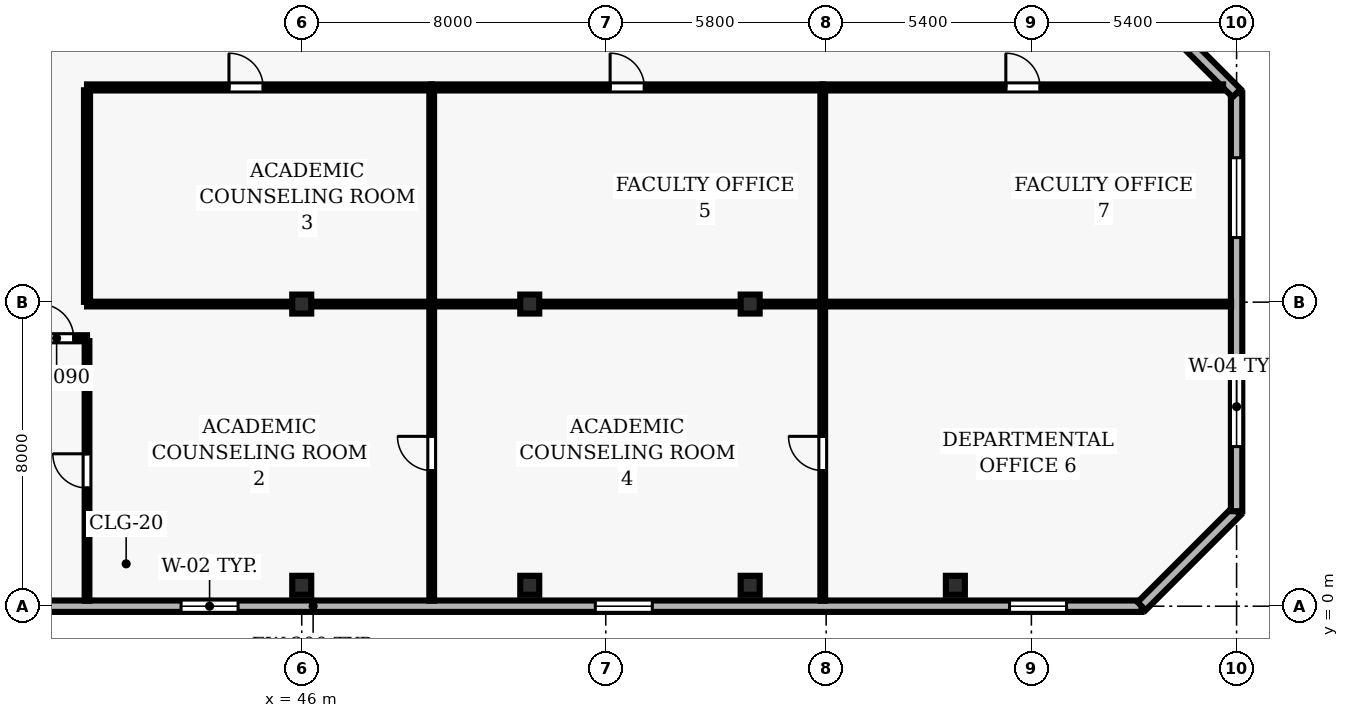
"""IFC4 building model, lengths in metres.
Left out: names, types, materials, properties, quantities, classifications, styles, units other than length and angle.
Written with IfcOpenShell. Run it as: python <this file> out.ifc"""

import sys

from ifc_helpers import new_model, si_unit, direction, frame, frame_2d, origin, origin_2d, place, context, subcontext, project, spatial, rectangle, hollow_rectangle, extrude, element, fill, save


model = new_model("IFC4")
c1 = context("Model", 3, precision=1e-05, world=origin(), true_north=direction((0.0, 1.0)))
c2 = subcontext(c1, "Body", "Model", "MODEL_VIEW")
j1 = project(units=[si_unit("LENGTHUNIT", "METRE"), si_unit("PLANEANGLEUNIT", "RADIAN")], contexts=[c1])
p1 = place(None, origin())
s1 = spatial("IfcSite", under=j1, at=p1, CompositionType="ELEMENT")
p2 = place(p1, origin())
s2 = spatial("IfcBuilding", under=s1, at=p2, CompositionType="ELEMENT")
p3 = place(p2, frame((0.0, 0.0, 154.1)))
s3 = spatial("IfcBuildingStorey", under=s2, at=p3, CompositionType="ELEMENT", Elevation=154.1)
for number, where, z_axis, x_axis in (
    (1, (46.0, 0.55, 0.0), (0.0, 0.0, 1.0), (1.0, 0.0, 0.0)),
    (2, (46.0, 7.95, 0.0), (0.0, 0.0, 1.0), (1.0, 0.0, 0.0)),
    (3, (52.0, 0.55, 0.0), (0.0, 0.0, 1.0), (1.0, 0.0, 0.0)),
    (4, (52.0, 7.95, 0.0), (0.0, 0.0, 1.0), (1.0, 0.0, 0.0)),
    (5, (57.8, 0.55, 0.0), (0.0, 0.0, 1.0), (1.0, 0.0, 0.0)),
    (6, (57.8, 7.95, 0.0), (0.0, 0.0, 1.0), (1.0, 0.0, 0.0)),
    (7, (63.2, 0.55, 0.0), (0.0, 0.0, 1.0), (1.0, 0.0, 0.0)),
):
    element("IfcColumn", number, at=place(p3, frame(where, z_axis=z_axis, x_axis=x_axis)), inside=s3, PredefinedType="COLUMN", context=c2, shape_type="SweptSolid", body=[
        extrude(hollow_rectangle(XDim=0.5, YDim=0.5, WallThickness=0.025, at=origin_2d()), origin(), (0.0, 0.0, 1.0), 3.9),
    ])
p4 = place(p3, frame((24.5, 0.0, 0.0), z_axis=(0.0, 0.0, 1.0), x_axis=(1.0, 0.0, 0.0)))
e8 = element("IfcWall", 8, at=p4, inside=s3, PredefinedType="SOLIDWALL", context=c2, shape_type="SweptSolid", body=[
    extrude(rectangle(XDim=43.6, YDim=0.3, at=frame_2d((21.8, 0.0))), origin(), (0.0, 0.0, 1.0), 3.69),
])
p5 = place(p4, frame((1.975, 0.0, 0.9)))
e9 = element("IfcOpeningElement", 9, at=p5, cuts=e8, PredefinedType="OPENING", context=c2, shape_type="SweptSolid", body=[
    extrude(rectangle(XDim=1.5, YDim=1.6, at=frame_2d((0.75, 0.8))), frame((0.0, 0.16, 0.0), z_axis=(0.0, -1.0, 0.0), x_axis=(1.0, 0.0, 0.0)), (0.0, 0.0, 1.0), 0.32),
])
p6 = place(p4, frame((8.325, 0.0, 0.9)))
e10 = element("IfcOpeningElement", 10, at=p6, cuts=e8, PredefinedType="OPENING", context=c2, shape_type="SweptSolid", body=[
    extrude(rectangle(XDim=1.5, YDim=1.6, at=frame_2d((0.75, 0.8))), frame((0.0, 0.16, 0.0), z_axis=(0.0, -1.0, 0.0), x_axis=(1.0, 0.0, 0.0)), (0.0, 0.0, 1.0), 0.32),
])
p7 = place(p4, frame((18.325, 0.0, 0.9)))
e11 = element("IfcOpeningElement", 11, at=p7, cuts=e8, PredefinedType="OPENING", context=c2, shape_type="SweptSolid", body=[
    extrude(rectangle(XDim=1.5, YDim=1.6, at=frame_2d((0.75, 0.8))), frame((0.0, 0.16, 0.0), z_axis=(0.0, -1.0, 0.0), x_axis=(1.0, 0.0, 0.0)), (0.0, 0.0, 1.0), 0.32),
])
p8 = place(p4, frame((29.225, 0.0, 0.9)))
e12 = element("IfcOpeningElement", 12, at=p8, cuts=e8, PredefinedType="OPENING", context=c2, shape_type="SweptSolid", body=[
    extrude(rectangle(XDim=1.5, YDim=1.6, at=frame_2d((0.75, 0.8))), frame((0.0, 0.16, 0.0), z_axis=(0.0, -1.0, 0.0), x_axis=(1.0, 0.0, 0.0)), (0.0, 0.0, 1.0), 0.32),
])
p9 = place(p4, frame((40.125, 0.0, 0.9)))
e13 = element("IfcOpeningElement", 13, at=p9, cuts=e8, PredefinedType="OPENING", context=c2, shape_type="SweptSolid", body=[
    extrude(rectangle(XDim=1.5, YDim=1.6, at=frame_2d((0.75, 0.8))), frame((0.0, 0.16, 0.0), z_axis=(0.0, -1.0, 0.0), x_axis=(1.0, 0.0, 0.0)), (0.0, 0.0, 1.0), 0.32),
])
p10 = place(p3, frame((68.1, 0.0, 0.0), z_axis=(0.0, 0.0, 1.0), x_axis=(0.707106781187, 0.707106781187, 0.0)))
e14 = element("IfcWall", 14, at=p10, inside=s3, PredefinedType="SOLIDWALL", context=c2, shape_type="SweptSolid", body=[
    extrude(rectangle(XDim=3.536, YDim=0.3, at=frame_2d((1.768, 0.0))), origin(), (0.0, 0.0, 1.0), 3.69),
])
p11 = place(p3, frame((70.6, 2.5, 0.0), z_axis=(0.0, 0.0, 1.0), x_axis=(0.0, 1.0, 0.0)))
e15 = element("IfcWall", 15, at=p11, inside=s3, PredefinedType="SOLIDWALL", context=c2, shape_type="SweptSolid", body=[
    extrude(rectangle(XDim=11.0, YDim=0.3, at=frame_2d((5.5, 0.0))), origin(), (0.0, 0.0, 1.0), 3.69),
])
p12 = place(p11, frame((1.7, 0.0, 0.9)))
e16 = element("IfcOpeningElement", 16, at=p12, cuts=e15, PredefinedType="OPENING", context=c2, shape_type="SweptSolid", body=[
    extrude(rectangle(XDim=2.1, YDim=1.6, at=frame_2d((1.05, 0.8))), frame((0.0, 0.16, 0.0), z_axis=(0.0, -1.0, 0.0), x_axis=(1.0, 0.0, 0.0)), (0.0, 0.0, 1.0), 0.32),
])
p13 = place(p11, frame((7.2, 0.0, 0.9)))
e17 = element("IfcOpeningElement", 17, at=p13, cuts=e15, PredefinedType="OPENING", context=c2, shape_type="SweptSolid", body=[
    extrude(rectangle(XDim=2.1, YDim=1.6, at=frame_2d((1.05, 0.8))), frame((0.0, 0.16, 0.0), z_axis=(0.0, -1.0, 0.0), x_axis=(1.0, 0.0, 0.0)), (0.0, 0.0, 1.0), 0.32),
])
p14 = place(p3, frame((70.6, 13.5, 0.0), z_axis=(0.0, 0.0, 1.0), x_axis=(-0.707106781187, 0.707106781187, 0.0)))
e18 = element("IfcWall", 18, at=p14, inside=s3, PredefinedType="SOLIDWALL", context=c2, shape_type="SweptSolid", body=[
    extrude(rectangle(XDim=3.536, YDim=0.3, at=frame_2d((1.768, 0.0))), origin(), (0.0, 0.0, 1.0), 3.69),
])
p15 = place(p3, frame((38.05, 7.05, 0.0), z_axis=(0.0, 0.0, 1.0), x_axis=(1.0, 0.0, 0.0)))
e19 = element("IfcWall", 19, at=p15, inside=s3, PredefinedType="PARTITIONING", context=c2, shape_type="SweptSolid", body=[
    extrude(rectangle(XDim=2.3, YDim=0.16, at=frame_2d((1.15, 0.0))), origin(), (0.0, 0.0, 1.0), 3.69),
])
p16 = place(p15, frame((1.05, 0.0, 0.0)))
e20 = element("IfcOpeningElement", 20, at=p16, cuts=e19, PredefinedType="OPENING", context=c2, shape_type="SweptSolid", body=[
    extrude(rectangle(XDim=0.9, YDim=2.1, at=frame_2d((0.45, 1.05))), frame((0.0, 0.09, 0.0), z_axis=(0.0, -1.0, 0.0), x_axis=(1.0, 0.0, 0.0)), (0.0, 0.0, 1.0), 0.18),
])
p17 = place(p3, frame((40.35, 13.65, 0.0), z_axis=(0.0, 0.0, 1.0), x_axis=(1.0, 0.0, 0.0)))
e21 = element("IfcWall", 21, at=p17, inside=s3, PredefinedType="PARTITIONING", context=c2, shape_type="SweptSolid", body=[
    extrude(rectangle(XDim=9.07, YDim=0.16, at=frame_2d((4.535, 0.0))), origin(), (0.0, 0.0, 1.0), 3.69),
])
p18 = place(p17, frame((3.735, 0.0, 0.0)))
e22 = element("IfcOpeningElement", 22, at=p18, cuts=e21, PredefinedType="OPENING", context=c2, shape_type="SweptSolid", body=[
    extrude(rectangle(XDim=0.9, YDim=2.1, at=frame_2d((0.45, 1.05))), frame((0.0, 0.09, 0.0), z_axis=(0.0, -1.0, 0.0), x_axis=(1.0, 0.0, 0.0)), (0.0, 0.0, 1.0), 0.18),
])
p19 = place(p3, frame((49.42, 7.95, 0.0), z_axis=(0.0, 0.0, 1.0), x_axis=(-1.0, 0.0, 0.0)))
e23 = element("IfcWall", 23, at=p19, inside=s3, PredefinedType="PARTITIONING", context=c2, shape_type="SweptSolid", body=[
    extrude(rectangle(XDim=9.07, YDim=0.125, at=frame_2d((4.535, 0.0))), origin(), (0.0, 0.0, 1.0), 3.073),
])
p20 = place(p3, frame((49.42, 13.65, 0.0), z_axis=(0.0, 0.0, 1.0), x_axis=(1.0, 0.0, 0.0)))
e24 = element("IfcWall", 24, at=p20, inside=s3, PredefinedType="PARTITIONING", context=c2, shape_type="SweptSolid", body=[
    extrude(rectangle(XDim=10.29, YDim=0.16, at=frame_2d((5.145, 0.0))), origin(), (0.0, 0.0, 1.0), 3.69),
])
p21 = place(p20, frame((4.695, 0.0, 0.0)))
e25 = element("IfcOpeningElement", 25, at=p21, cuts=e24, PredefinedType="OPENING", context=c2, shape_type="SweptSolid", body=[
    extrude(rectangle(XDim=0.9, YDim=2.1, at=frame_2d((0.45, 1.05))), frame((0.0, 0.09, 0.0), z_axis=(0.0, -1.0, 0.0), x_axis=(1.0, 0.0, 0.0)), (0.0, 0.0, 1.0), 0.18),
])
p22 = place(p3, frame((59.71, 7.95, 0.0), z_axis=(0.0, 0.0, 1.0), x_axis=(-1.0, 0.0, 0.0)))
e26 = element("IfcWall", 26, at=p22, inside=s3, PredefinedType="PARTITIONING", context=c2, shape_type="SweptSolid", body=[
    extrude(rectangle(XDim=10.29, YDim=0.125, at=frame_2d((5.145, 0.0))), origin(), (0.0, 0.0, 1.0), 3.073),
])
p23 = place(p3, frame((59.71, 13.65, 0.0), z_axis=(0.0, 0.0, 1.0), x_axis=(1.0, 0.0, 0.0)))
e27 = element("IfcWall", 27, at=p23, inside=s3, PredefinedType="PARTITIONING", context=c2, shape_type="SweptSolid", body=[
    extrude(rectangle(XDim=10.535, YDim=0.16, at=frame_2d((5.268, 0.0))), origin(), (0.0, 0.0, 1.0), 3.69),
])
p24 = place(p23, frame((4.818, 0.0, 0.0)))
e28 = element("IfcOpeningElement", 28, at=p24, cuts=e27, PredefinedType="OPENING", context=c2, shape_type="SweptSolid", body=[
    extrude(rectangle(XDim=0.9, YDim=2.1, at=frame_2d((0.45, 1.05))), frame((0.0, 0.09, 0.0), z_axis=(0.0, -1.0, 0.0), x_axis=(1.0, 0.0, 0.0)), (0.0, 0.0, 1.0), 0.18),
])
p25 = place(p3, frame((70.455, 7.95, 0.0), z_axis=(0.0, 0.0, 1.0), x_axis=(-1.0, 0.0, 0.0)))
e29 = element("IfcWall", 29, at=p25, inside=s3, PredefinedType="PARTITIONING", context=c2, shape_type="SweptSolid", body=[
    extrude(rectangle(XDim=10.745, YDim=0.125, at=frame_2d((5.373, 0.0))), origin(), (0.0, 0.0, 1.0), 3.69),
])
p26 = place(p3, frame((40.35, 0.145, 0.0), z_axis=(0.0, 0.0, 1.0), x_axis=(0.0, 1.0, 0.0)))
e30 = element("IfcWall", 30, at=p26, inside=s3, PredefinedType="PARTITIONING", context=c2, shape_type="SweptSolid", body=[
    extrude(rectangle(XDim=6.83, YDim=0.125, at=frame_2d((3.415, 0.0))), origin(), (0.0, 0.0, 1.0), 3.69),
])
p27 = place(p26, frame((2.965, 0.0, 0.0)))
e31 = element("IfcOpeningElement", 31, at=p27, cuts=e30, PredefinedType="OPENING", context=c2, shape_type="SweptSolid", body=[
    extrude(rectangle(XDim=0.9, YDim=2.1, at=frame_2d((0.45, 1.05))), frame((0.0, 0.073, 0.0), z_axis=(0.0, -1.0, 0.0), x_axis=(1.0, 0.0, 0.0)), (0.0, 0.0, 1.0), 0.145),
])
p28 = place(p3, frame((40.35, 8.008, 0.0), z_axis=(0.0, 0.0, 1.0), x_axis=(0.0, 1.0, 0.0)))
e32 = element("IfcWall", 32, at=p28, inside=s3, PredefinedType="PARTITIONING", context=c2, shape_type="SweptSolid", body=[
    extrude(rectangle(XDim=5.567, YDim=0.16, at=frame_2d((2.783, 0.0))), origin(), (0.0, 0.0, 1.0), 3.69),
])
p29 = place(p3, frame((49.42, 0.145, 0.0), z_axis=(0.0, 0.0, 1.0), x_axis=(0.0, 1.0, 0.0)))
e33 = element("IfcWall", 33, at=p29, inside=s3, PredefinedType="PARTITIONING", context=c2, shape_type="SweptSolid", body=[
    extrude(rectangle(XDim=7.748, YDim=0.125, at=frame_2d((3.874, 0.0))), origin(), (0.0, 0.0, 1.0), 3.69),
])
p30 = place(p29, frame((3.424, 0.0, 0.0)))
e34 = element("IfcOpeningElement", 34, at=p30, cuts=e33, PredefinedType="OPENING", context=c2, shape_type="SweptSolid", body=[
    extrude(rectangle(XDim=0.9, YDim=2.1, at=frame_2d((0.45, 1.05))), frame((0.0, 0.073, 0.0), z_axis=(0.0, -1.0, 0.0), x_axis=(1.0, 0.0, 0.0)), (0.0, 0.0, 1.0), 0.145),
])
p31 = place(p3, frame((49.42, 8.008, 0.0), z_axis=(0.0, 0.0, 1.0), x_axis=(0.0, 1.0, 0.0)))
e35 = element("IfcWall", 35, at=p31, inside=s3, PredefinedType="PARTITIONING", context=c2, shape_type="SweptSolid", body=[
    extrude(rectangle(XDim=5.567, YDim=0.125, at=frame_2d((2.783, 0.0))), origin(), (0.0, 0.0, 1.0), 3.69),
])
p32 = place(p3, frame((59.71, 0.145, 0.0), z_axis=(0.0, 0.0, 1.0), x_axis=(0.0, 1.0, 0.0)))
e36 = element("IfcWall", 36, at=p32, inside=s3, PredefinedType="PARTITIONING", context=c2, shape_type="SweptSolid", body=[
    extrude(rectangle(XDim=7.748, YDim=0.125, at=frame_2d((3.874, 0.0))), origin(), (0.0, 0.0, 1.0), 3.69),
])
p33 = place(p32, frame((3.424, 0.0, 0.0)))
e37 = element("IfcOpeningElement", 37, at=p33, cuts=e36, PredefinedType="OPENING", context=c2, shape_type="SweptSolid", body=[
    extrude(rectangle(XDim=0.9, YDim=2.1, at=frame_2d((0.45, 1.05))), frame((0.0, 0.073, 0.0), z_axis=(0.0, -1.0, 0.0), x_axis=(1.0, 0.0, 0.0)), (0.0, 0.0, 1.0), 0.145),
])
p34 = place(p3, frame((59.71, 8.008, 0.0), z_axis=(0.0, 0.0, 1.0), x_axis=(0.0, 1.0, 0.0)))
e38 = element("IfcWall", 38, at=p34, inside=s3, PredefinedType="PARTITIONING", context=c2, shape_type="SweptSolid", body=[
    extrude(rectangle(XDim=5.567, YDim=0.125, at=frame_2d((2.783, 0.0))), origin(), (0.0, 0.0, 1.0), 3.69),
])
p35 = place(p7, origin())
e39 = element("IfcWindow", 39, at=p35, inside=s3, PartitioningType="SINGLE_PANEL", PredefinedType="WINDOW", context=c2, shape_type="SweptSolid", body=[
    extrude(rectangle(XDim=1.5, YDim=1.6, at=frame_2d((0.75, 0.8))), frame((0.0, 0.03, 0.0), z_axis=(0.0, -1.0, 0.0), x_axis=(1.0, 0.0, 0.0)), (0.0, 0.0, 1.0), 0.06),
])
fill(e11, e39)
p36 = place(p8, origin())
e40 = element("IfcWindow", 40, at=p36, inside=s3, PartitioningType="SINGLE_PANEL", PredefinedType="WINDOW", context=c2, shape_type="SweptSolid", body=[
    extrude(rectangle(XDim=1.5, YDim=1.6, at=frame_2d((0.75, 0.8))), frame((0.0, 0.03, 0.0), z_axis=(0.0, -1.0, 0.0), x_axis=(1.0, 0.0, 0.0)), (0.0, 0.0, 1.0), 0.06),
])
fill(e12, e40)
p37 = place(p9, origin())
e41 = element("IfcWindow", 41, at=p37, inside=s3, PartitioningType="SINGLE_PANEL", PredefinedType="WINDOW", context=c2, shape_type="SweptSolid", body=[
    extrude(rectangle(XDim=1.5, YDim=1.6, at=frame_2d((0.75, 0.8))), frame((0.0, 0.03, 0.0), z_axis=(0.0, -1.0, 0.0), x_axis=(1.0, 0.0, 0.0)), (0.0, 0.0, 1.0), 0.06),
])
fill(e13, e41)
p38 = place(p12, origin())
e42 = element("IfcWindow", 42, at=p38, inside=s3, PartitioningType="SINGLE_PANEL", PredefinedType="WINDOW", context=c2, shape_type="SweptSolid", body=[
    extrude(rectangle(XDim=2.1, YDim=1.6, at=frame_2d((1.05, 0.8))), frame((0.0, 0.03, 0.0), z_axis=(0.0, -1.0, 0.0), x_axis=(1.0, 0.0, 0.0)), (0.0, 0.0, 1.0), 0.06),
])
fill(e16, e42)
p39 = place(p13, origin())
e43 = element("IfcWindow", 43, at=p39, inside=s3, PartitioningType="SINGLE_PANEL", PredefinedType="WINDOW", context=c2, shape_type="SweptSolid", body=[
    extrude(rectangle(XDim=2.1, YDim=1.6, at=frame_2d((1.05, 0.8))), frame((0.0, 0.03, 0.0), z_axis=(0.0, -1.0, 0.0), x_axis=(1.0, 0.0, 0.0)), (0.0, 0.0, 1.0), 0.06),
])
fill(e17, e43)
p40 = place(p16, origin())
e44 = element("IfcDoor", 44, at=p40, inside=s3, OperationType="SINGLE_SWING_LEFT", PredefinedType="DOOR", context=c2, shape_type="SweptSolid", body=[
    extrude(rectangle(XDim=0.9, YDim=2.1, at=frame_2d((0.45, 1.05))), frame((0.0, 0.025, 0.0), z_axis=(0.0, -1.0, 0.0), x_axis=(1.0, 0.0, 0.0)), (0.0, 0.0, 1.0), 0.05),
])
fill(e20, e44)
p41 = place(p27, origin())
e45 = element("IfcDoor", 45, at=p41, inside=s3, OperationType="SINGLE_SWING_RIGHT", PredefinedType="DOOR", context=c2, shape_type="SweptSolid", body=[
    extrude(rectangle(XDim=0.9, YDim=2.1, at=frame_2d((0.45, 1.05))), frame((0.0, 0.025, 0.0), z_axis=(0.0, -1.0, 0.0), x_axis=(1.0, 0.0, 0.0)), (0.0, 0.0, 1.0), 0.05),
])
fill(e31, e45)
p42 = place(p18, origin())
e46 = element("IfcDoor", 46, at=p42, inside=s3, OperationType="SINGLE_SWING_LEFT", PredefinedType="DOOR", context=c2, shape_type="SweptSolid", body=[
    extrude(rectangle(XDim=0.9, YDim=2.1, at=frame_2d((0.45, 1.05))), frame((0.0, 0.025, 0.0), z_axis=(0.0, -1.0, 0.0), x_axis=(1.0, 0.0, 0.0)), (0.0, 0.0, 1.0), 0.05),
])
fill(e22, e46)
p43 = place(p30, origin())
e47 = element("IfcDoor", 47, at=p43, inside=s3, OperationType="SINGLE_SWING_RIGHT", PredefinedType="DOOR", context=c2, shape_type="SweptSolid", body=[
    extrude(rectangle(XDim=0.9, YDim=2.1, at=frame_2d((0.45, 1.05))), frame((0.0, 0.025, 0.0), z_axis=(0.0, -1.0, 0.0), x_axis=(1.0, 0.0, 0.0)), (0.0, 0.0, 1.0), 0.05),
])
fill(e34, e47)
p44 = place(p21, origin())
e48 = element("IfcDoor", 48, at=p44, inside=s3, OperationType="SINGLE_SWING_LEFT", PredefinedType="DOOR", context=c2, shape_type="SweptSolid", body=[
    extrude(rectangle(XDim=0.9, YDim=2.1, at=frame_2d((0.45, 1.05))), frame((0.0, 0.025, 0.0), z_axis=(0.0, -1.0, 0.0), x_axis=(1.0, 0.0, 0.0)), (0.0, 0.0, 1.0), 0.05),
])
fill(e25, e48)
p45 = place(p33, origin())
e49 = element("IfcDoor", 49, at=p45, inside=s3, OperationType="SINGLE_SWING_RIGHT", PredefinedType="DOOR", context=c2, shape_type="SweptSolid", body=[
    extrude(rectangle(XDim=0.9, YDim=2.1, at=frame_2d((0.45, 1.05))), frame((0.0, 0.025, 0.0), z_axis=(0.0, -1.0, 0.0), x_axis=(1.0, 0.0, 0.0)), (0.0, 0.0, 1.0), 0.05),
])
fill(e37, e49)
p46 = place(p24, origin())
e50 = element("IfcDoor", 50, at=p46, inside=s3, OperationType="SINGLE_SWING_LEFT", PredefinedType="DOOR", context=c2, shape_type="SweptSolid", body=[
    extrude(rectangle(XDim=0.9, YDim=2.1, at=frame_2d((0.45, 1.05))), frame((0.0, 0.025, 0.0), z_axis=(0.0, -1.0, 0.0), x_axis=(1.0, 0.0, 0.0)), (0.0, 0.0, 1.0), 0.05),
])
fill(e28, e50)
save(model, sys.argv[1])
